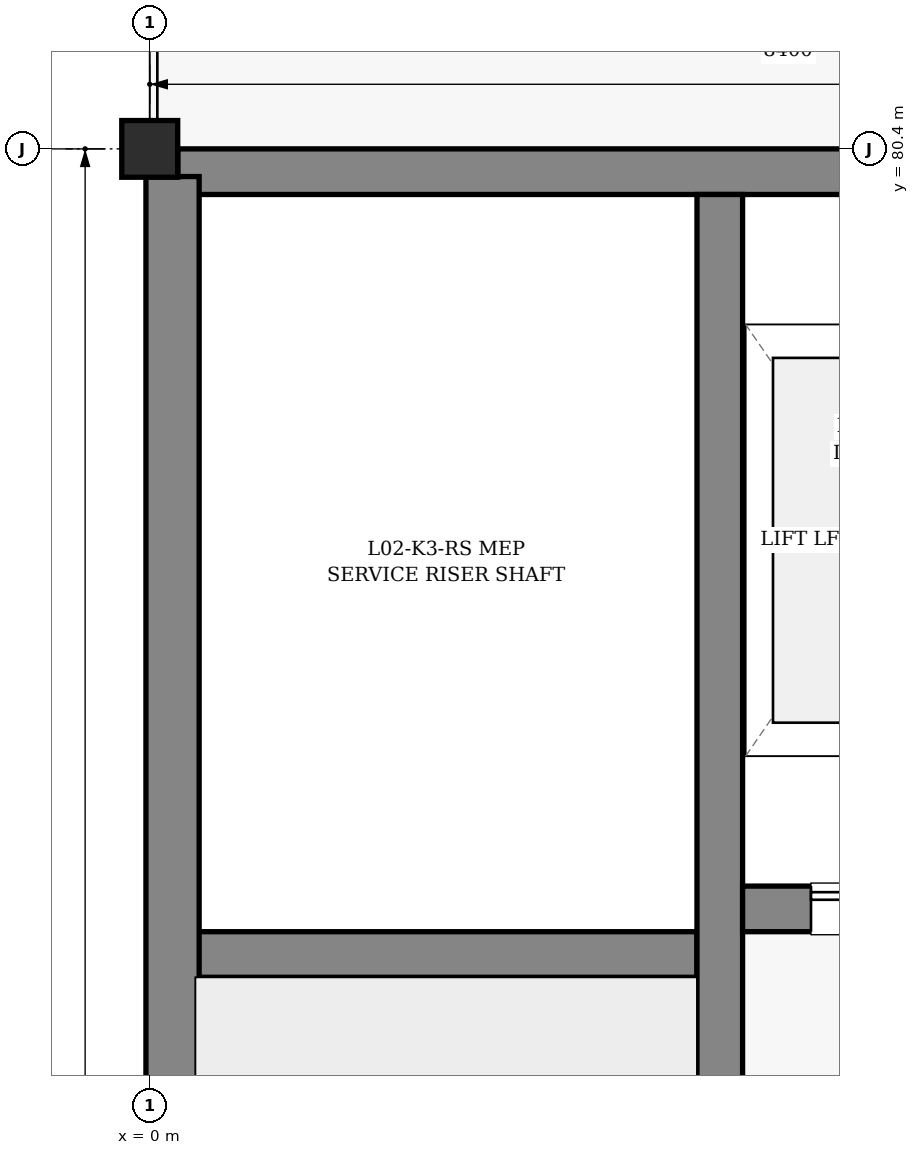
"""IFC4 building model, lengths in metres.
Left out: names, types, materials, properties, quantities, classifications, styles, units other than length and angle.
Written with IfcOpenShell. Run it as: python <this file> out.ifc"""

import sys

from ifc_helpers import new_model, si_unit, direction, frame, frame_2d, origin, origin_2d, place, context, subcontext, project, spatial, rectangle, i_section, extrude, element, fill, save


model = new_model("IFC4")
c1 = context("Model", 3, precision=1e-05, world=origin(), true_north=direction((0.0, 1.0)))
c2 = subcontext(c1, "Body", "Model", "MODEL_VIEW")
j1 = project(units=[si_unit("LENGTHUNIT", "METRE"), si_unit("PLANEANGLEUNIT", "RADIAN")], contexts=[c1])
p1 = place(None, origin())
s1 = spatial("IfcSite", under=j1, at=p1, CompositionType="ELEMENT")
p2 = place(p1, origin())
s2 = spatial("IfcBuilding", under=s1, at=p2, CompositionType="ELEMENT")
p3 = place(p2, frame((0.0, 0.0, 9.0)))
s3 = spatial("IfcBuildingStorey", under=s2, at=p3, CompositionType="ELEMENT", Elevation=9.0)
p4 = place(p3, frame((0.0, 80.4, 0.0), z_axis=(0.0, 0.0, 1.0), x_axis=(1.0, 0.0, 0.0)))
e1 = element("IfcColumn", 1, at=p4, inside=s3, PredefinedType="COLUMN", context=c2, shape_type="SweptSolid", body=[
    extrude(i_section(OverallWidth=0.373, OverallDepth=0.368, WebThickness=0.014, FlangeThickness=0.024, FilletRadius=0.015, at=origin_2d()), origin(), (0.0, 0.0, 1.0), 3.6),
])
p5 = place(p3, frame((0.185, 80.25, 0.0), z_axis=(0.0, 0.0, 1.0), x_axis=(1.0, 0.0, 0.0)))
e2 = element("IfcWall", 2, at=p5, inside=s3, PredefinedType="SHEAR", context=c2, shape_type="SweptSolid", body=[
    extrude(rectangle(XDim=8.031, YDim=0.3, at=frame_2d((4.016, 0.0))), origin(), (0.0, 0.0, 1.0), 3.38),
])
p6 = place(p3, frame((0.3, 75.1, 0.0), z_axis=(0.0, 0.0, 1.0), x_axis=(1.0, 0.0, 0.0)))
e3 = element("IfcWall", 3, at=p6, inside=s3, PredefinedType="SHEAR", context=c2, shape_type="SweptSolid", body=[
    extrude(rectangle(XDim=3.3, YDim=0.3, at=frame_2d((1.65, 0.0))), origin(), (0.0, 0.0, 1.0), 3.38),
])
p7 = place(p3, frame((0.15, 63.782, 0.0), z_axis=(0.0, 0.0, 1.0), x_axis=(0.0, 1.0, 0.0)))
e4 = element("IfcWall", 4, at=p7, inside=s3, PredefinedType="SHEAR", context=c2, shape_type="SweptSolid", body=[
    extrude(rectangle(XDim=16.436, YDim=0.35, at=frame_2d((8.218, 0.0))), origin(), (0.0, 0.0, 1.0), 3.38),
])
p8 = place(p3, frame((3.75, 63.9, 0.0), z_axis=(0.0, 0.0, 1.0), x_axis=(0.0, 1.0, 0.0)))
e5 = element("IfcWall", 5, at=p8, inside=s3, PredefinedType="SHEAR", context=c2, shape_type="SweptSolid", body=[
    extrude(rectangle(XDim=16.2, YDim=0.3, at=frame_2d((8.1, 0.0))), origin(), (0.0, 0.0, 1.0), 3.38),
])
p9 = place(p8, frame((0.5, 0.0, 0.0)))
e6 = element("IfcOpeningElement", 6, at=p9, cuts=e5, PredefinedType="OPENING", context=c2, shape_type="SweptSolid", body=[
    extrude(rectangle(XDim=1.15, YDim=2.15, at=frame_2d((0.575, 1.075))), frame((0.0, 0.16, 0.0), z_axis=(0.0, -1.0, 0.0), x_axis=(1.0, 0.0, 0.0)), (0.0, 0.0, 1.0), 0.32),
])
p10 = place(p3, frame((3.9, 75.4, 0.0), z_axis=(0.0, 0.0, 1.0), x_axis=(1.0, 0.0, 0.0)))
e7 = element("IfcWall", 7, at=p10, inside=s3, PredefinedType="SHEAR", context=c2, shape_type="SweptSolid", body=[
    extrude(rectangle(XDim=2.2, YDim=0.3, at=frame_2d((1.1, 0.0))), origin(), (0.0, 0.0, 1.0), 3.38),
])
p11 = place(p10, frame((0.45, 0.0, 0.0)))
e8 = element("IfcOpeningElement", 8, at=p11, cuts=e7, PredefinedType="OPENING", context=c2, shape_type="SweptSolid", body=[
    extrude(rectangle(XDim=1.1, YDim=2.2, at=frame_2d((0.55, 1.1))), frame((0.0, 0.16, 0.0), z_axis=(0.0, -1.0, 0.0), x_axis=(1.0, 0.0, 0.0)), (0.0, 0.0, 1.0), 0.32),
])
p12 = place(p11, origin())
e9 = element("IfcDoor", 9, at=p12, inside=s3, OperationType="SLIDING_TO_LEFT", PredefinedType="DOOR", context=c2, shape_type="SweptSolid", body=[
    extrude(rectangle(XDim=1.1, YDim=2.2, at=frame_2d((0.55, 1.1))), frame((0.0, 0.025, 0.0), z_axis=(0.0, -1.0, 0.0), x_axis=(1.0, 0.0, 0.0)), (0.0, 0.0, 1.0), 0.05),
])
fill(e8, e9)
save(model, sys.argv[1])
